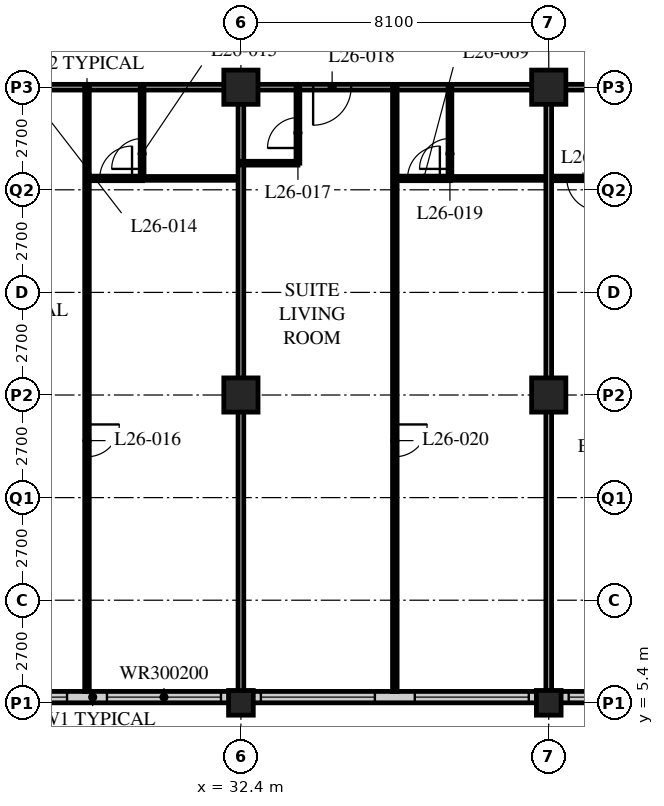
"""IFC4 building model, lengths in metres.
Left out: names, types, materials, properties, quantities, classifications, styles, units other than length and angle.
Written with IfcOpenShell. Run it as: python <this file> out.ifc"""

import sys

from ifc_helpers import new_model, si_unit, direction, frame, frame_2d, origin, origin_2d, place, context, subcontext, project, spatial, rectangle, hollow_rectangle, extrude, element, fill, save


model = new_model("IFC4")
c1 = context("Model", 3, precision=1e-05, world=origin(), true_north=direction((0.0, 1.0)))
c2 = subcontext(c1, "Body", "Model", "MODEL_VIEW")
j1 = project(units=[si_unit("LENGTHUNIT", "METRE"), si_unit("PLANEANGLEUNIT", "RADIAN")], contexts=[c1])
p1 = place(None, origin())
s1 = spatial("IfcSite", under=j1, at=p1, CompositionType="ELEMENT")
p2 = place(p1, origin())
s2 = spatial("IfcBuilding", under=s1, at=p2, CompositionType="ELEMENT")
p3 = place(p2, frame((0.0, 0.0, 106.8)))
s3 = spatial("IfcBuildingStorey", under=s2, at=p3, CompositionType="ELEMENT", Elevation=106.8)
p4 = place(p3, frame((32.4, 5.4, 0.0), z_axis=(0.0, 0.0, 1.0), x_axis=(1.0, 0.0, 0.0)))
e1 = element("IfcColumn", 1, at=p4, inside=s3, PredefinedType="COLUMN", context=c2, shape_type="SweptSolid", body=[
    extrude(hollow_rectangle(XDim=0.65, YDim=0.65, WallThickness=0.055, at=origin_2d()), origin(), (0.0, 0.0, 1.0), 3.4),
])
for number, where, z_axis, x_axis in (
    (2, (32.4, 13.5, 0.0), (0.0, 0.0, 1.0), (1.0, 0.0, 0.0)),
    (3, (32.4, 21.6, 0.0), (0.0, 0.0, 1.0), (1.0, 0.0, 0.0)),
):
    element("IfcColumn", number, at=place(p3, frame(where, z_axis=z_axis, x_axis=x_axis)), inside=s3, PredefinedType="COLUMN", context=c2, shape_type="SweptSolid", body=[
        extrude(hollow_rectangle(XDim=0.9, YDim=0.9, WallThickness=0.09, at=origin_2d()), origin(), (0.0, 0.0, 1.0), 3.4),
    ])
p5 = place(p3, frame((40.5, 5.4, 0.0), z_axis=(0.0, 0.0, 1.0), x_axis=(1.0, 0.0, 0.0)))
e4 = element("IfcColumn", 4, at=p5, inside=s3, PredefinedType="COLUMN", context=c2, shape_type="SweptSolid", body=[
    extrude(hollow_rectangle(XDim=0.65, YDim=0.65, WallThickness=0.055, at=origin_2d()), origin(), (0.0, 0.0, 1.0), 3.4),
])
for number, where, z_axis, x_axis in (
    (5, (40.5, 13.5, 0.0), (0.0, 0.0, 1.0), (1.0, 0.0, 0.0)),
    (6, (40.5, 21.6, 0.0), (0.0, 0.0, 1.0), (1.0, 0.0, 0.0)),
):
    element("IfcColumn", number, at=place(p3, frame(where, z_axis=z_axis, x_axis=x_axis)), inside=s3, PredefinedType="COLUMN", context=c2, shape_type="SweptSolid", body=[
        extrude(hollow_rectangle(XDim=0.9, YDim=0.9, WallThickness=0.09, at=origin_2d()), origin(), (0.0, 0.0, 1.0), 3.4),
    ])
p6 = place(p3, frame((8.4, 5.55, 0.0), z_axis=(0.0, 0.0, 1.0), x_axis=(1.0, 0.0, 0.0)))
e7 = element("IfcWall", 7, at=p6, inside=s3, PredefinedType="SOLIDWALL", context=c2, shape_type="SweptSolid", body=[
    extrude(rectangle(XDim=40.2, YDim=0.3, at=frame_2d((20.1, 0.0))), origin(), (0.0, 0.0, 1.0), 3.19),
])
p7 = place(p6, frame((0.225, 0.0, 0.9)))
e8 = element("IfcOpeningElement", 8, at=p7, cuts=e7, PredefinedType="OPENING", context=c2, shape_type="SweptSolid", body=[
    extrude(rectangle(XDim=3.0, YDim=2.0, at=frame_2d((1.5, 1.0))), frame((0.0, 0.16, 0.0), z_axis=(0.0, -1.0, 0.0), x_axis=(1.0, 0.0, 0.0)), (0.0, 0.0, 1.0), 0.32),
])
p8 = place(p6, frame((4.275, 0.0, 0.9)))
e9 = element("IfcOpeningElement", 9, at=p8, cuts=e7, PredefinedType="OPENING", context=c2, shape_type="SweptSolid", body=[
    extrude(rectangle(XDim=3.0, YDim=2.0, at=frame_2d((1.5, 1.0))), frame((0.0, 0.16, 0.0), z_axis=(0.0, -1.0, 0.0), x_axis=(1.0, 0.0, 0.0)), (0.0, 0.0, 1.0), 0.32),
])
p9 = place(p6, frame((8.325, 0.0, 0.9)))
e10 = element("IfcOpeningElement", 10, at=p9, cuts=e7, PredefinedType="OPENING", context=c2, shape_type="SweptSolid", body=[
    extrude(rectangle(XDim=3.0, YDim=2.0, at=frame_2d((1.5, 1.0))), frame((0.0, 0.16, 0.0), z_axis=(0.0, -1.0, 0.0), x_axis=(1.0, 0.0, 0.0)), (0.0, 0.0, 1.0), 0.32),
])
p10 = place(p6, frame((12.375, 0.0, 0.9)))
e11 = element("IfcOpeningElement", 11, at=p10, cuts=e7, PredefinedType="OPENING", context=c2, shape_type="SweptSolid", body=[
    extrude(rectangle(XDim=3.0, YDim=2.0, at=frame_2d((1.5, 1.0))), frame((0.0, 0.16, 0.0), z_axis=(0.0, -1.0, 0.0), x_axis=(1.0, 0.0, 0.0)), (0.0, 0.0, 1.0), 0.32),
])
p11 = place(p6, frame((16.425, 0.0, 0.9)))
e12 = element("IfcOpeningElement", 12, at=p11, cuts=e7, PredefinedType="OPENING", context=c2, shape_type="SweptSolid", body=[
    extrude(rectangle(XDim=3.0, YDim=2.0, at=frame_2d((1.5, 1.0))), frame((0.0, 0.16, 0.0), z_axis=(0.0, -1.0, 0.0), x_axis=(1.0, 0.0, 0.0)), (0.0, 0.0, 1.0), 0.32),
])
p12 = place(p6, frame((20.475, 0.0, 0.9)))
e13 = element("IfcOpeningElement", 13, at=p12, cuts=e7, PredefinedType="OPENING", context=c2, shape_type="SweptSolid", body=[
    extrude(rectangle(XDim=3.0, YDim=2.0, at=frame_2d((1.5, 1.0))), frame((0.0, 0.16, 0.0), z_axis=(0.0, -1.0, 0.0), x_axis=(1.0, 0.0, 0.0)), (0.0, 0.0, 1.0), 0.32),
])
p13 = place(p6, frame((24.525, 0.0, 0.9)))
e14 = element("IfcOpeningElement", 14, at=p13, cuts=e7, PredefinedType="OPENING", context=c2, shape_type="SweptSolid", body=[
    extrude(rectangle(XDim=3.0, YDim=2.0, at=frame_2d((1.5, 1.0))), frame((0.0, 0.16, 0.0), z_axis=(0.0, -1.0, 0.0), x_axis=(1.0, 0.0, 0.0)), (0.0, 0.0, 1.0), 0.32),
])
p14 = place(p6, frame((28.575, 0.0, 0.9)))
e15 = element("IfcOpeningElement", 15, at=p14, cuts=e7, PredefinedType="OPENING", context=c2, shape_type="SweptSolid", body=[
    extrude(rectangle(XDim=3.0, YDim=2.0, at=frame_2d((1.5, 1.0))), frame((0.0, 0.16, 0.0), z_axis=(0.0, -1.0, 0.0), x_axis=(1.0, 0.0, 0.0)), (0.0, 0.0, 1.0), 0.32),
])
p15 = place(p6, frame((32.625, 0.0, 0.9)))
e16 = element("IfcOpeningElement", 16, at=p15, cuts=e7, PredefinedType="OPENING", context=c2, shape_type="SweptSolid", body=[
    extrude(rectangle(XDim=3.0, YDim=2.0, at=frame_2d((1.5, 1.0))), frame((0.0, 0.16, 0.0), z_axis=(0.0, -1.0, 0.0), x_axis=(1.0, 0.0, 0.0)), (0.0, 0.0, 1.0), 0.32),
])
p16 = place(p6, frame((36.675, 0.0, 0.9)))
e17 = element("IfcOpeningElement", 17, at=p16, cuts=e7, PredefinedType="OPENING", context=c2, shape_type="SweptSolid", body=[
    extrude(rectangle(XDim=3.0, YDim=2.0, at=frame_2d((1.5, 1.0))), frame((0.0, 0.16, 0.0), z_axis=(0.0, -1.0, 0.0), x_axis=(1.0, 0.0, 0.0)), (0.0, 0.0, 1.0), 0.32),
])
p17 = place(p3, frame((12.15, 21.6, 0.0), z_axis=(0.0, 0.0, 1.0), x_axis=(1.0, 0.0, 0.0)))
e18 = element("IfcWall", 18, at=p17, inside=s3, PredefinedType="PARTITIONING", context=c2, shape_type="SweptSolid", body=[
    extrude(rectangle(XDim=32.4, YDim=0.15, at=frame_2d((16.2, 0.0))), origin(), (0.0, 0.0, 1.0), 2.578),
])
p18 = place(p17, frame((5.95, 0.0, 0.0)))
e19 = element("IfcOpeningElement", 19, at=p18, cuts=e18, PredefinedType="OPENING", context=c2, shape_type="SweptSolid", body=[
    extrude(rectangle(XDim=1.0, YDim=2.1, at=frame_2d((0.5, 1.05))), frame((0.0, 0.085, 0.0), z_axis=(0.0, -1.0, 0.0), x_axis=(1.0, 0.0, 0.0)), (0.0, 0.0, 1.0), 0.17),
])
p19 = place(p17, frame((14.05, 0.0, 0.0)))
e20 = element("IfcOpeningElement", 20, at=p19, cuts=e18, PredefinedType="OPENING", context=c2, shape_type="SweptSolid", body=[
    extrude(rectangle(XDim=1.0, YDim=2.1, at=frame_2d((0.5, 1.05))), frame((0.0, 0.085, 0.0), z_axis=(0.0, -1.0, 0.0), x_axis=(1.0, 0.0, 0.0)), (0.0, 0.0, 1.0), 0.17),
])
p20 = place(p17, frame((22.15, 0.0, 0.0)))
e21 = element("IfcOpeningElement", 21, at=p20, cuts=e18, PredefinedType="OPENING", context=c2, shape_type="SweptSolid", body=[
    extrude(rectangle(XDim=1.0, YDim=2.1, at=frame_2d((0.5, 1.05))), frame((0.0, 0.085, 0.0), z_axis=(0.0, -1.0, 0.0), x_axis=(1.0, 0.0, 0.0)), (0.0, 0.0, 1.0), 0.17),
])
p21 = place(p17, frame((1.525, 0.0, 0.0)))
e22 = element("IfcOpeningElement", 22, at=p21, cuts=e18, PredefinedType="OPENING", context=c2, shape_type="SweptSolid", body=[
    extrude(rectangle(XDim=1.0, YDim=2.1, at=frame_2d((0.5, 1.05))), frame((0.0, 0.085, 0.0), z_axis=(0.0, -1.0, 0.0), x_axis=(1.0, 0.0, 0.0)), (0.0, 0.0, 1.0), 0.17),
])
p22 = place(p17, frame((29.875, 0.0, 0.0)))
e23 = element("IfcOpeningElement", 23, at=p22, cuts=e18, PredefinedType="OPENING", context=c2, shape_type="SweptSolid", body=[
    extrude(rectangle(XDim=1.0, YDim=2.1, at=frame_2d((0.5, 1.05))), frame((0.0, 0.085, 0.0), z_axis=(0.0, -1.0, 0.0), x_axis=(1.0, 0.0, 0.0)), (0.0, 0.0, 1.0), 0.17),
])
p23 = place(p3, frame((29.8, 19.2, 0.0), z_axis=(0.0, 0.0, 1.0), x_axis=(1.0, 0.0, 0.0)))
e24 = element("IfcWall", 24, at=p23, inside=s3, PredefinedType="PARTITIONING", context=c2, shape_type="SweptSolid", body=[
    extrude(rectangle(XDim=2.6, YDim=0.1, at=frame_2d((1.3, 0.0))), origin(), (0.0, 0.0, 1.0), 3.19),
])
p24 = place(p3, frame((29.8, 21.6, 0.0), z_axis=(0.0, 0.0, 1.0), x_axis=(0.0, -1.0, 0.0)))
e25 = element("IfcWall", 25, at=p24, inside=s3, PredefinedType="PARTITIONING", context=c2, shape_type="SweptSolid", body=[
    extrude(rectangle(XDim=2.4, YDim=0.1, at=frame_2d((1.2, 0.0))), origin(), (0.0, 0.0, 1.0), 3.19),
])
p25 = place(p24, frame((1.35, 0.0, 0.0)))
e26 = element("IfcOpeningElement", 26, at=p25, cuts=e25, PredefinedType="OPENING", context=c2, shape_type="SweptSolid", body=[
    extrude(rectangle(XDim=0.8, YDim=2.1, at=frame_2d((0.4, 1.05))), frame((0.0, 0.06, 0.0), z_axis=(0.0, -1.0, 0.0), x_axis=(1.0, 0.0, 0.0)), (0.0, 0.0, 1.0), 0.12),
])
p26 = place(p3, frame((28.35, 21.6, 0.0), z_axis=(0.0, 0.0, 1.0), x_axis=(0.0, -1.0, 0.0)))
e27 = element("IfcWall", 27, at=p26, inside=s3, PredefinedType="PARTITIONING", context=c2, shape_type="SweptSolid", body=[
    extrude(rectangle(XDim=15.9, YDim=0.12, at=frame_2d((7.95, 0.0))), origin(), (0.0, 0.0, 1.0), 3.19),
])
p27 = place(p26, frame((8.875, 0.0, 0.0)))
e28 = element("IfcOpeningElement", 28, at=p27, cuts=e27, PredefinedType="OPENING", context=c2, shape_type="SweptSolid", body=[
    extrude(rectangle(XDim=0.85, YDim=2.1, at=frame_2d((0.425, 1.05))), frame((0.0, 0.07, 0.0), z_axis=(0.0, -1.0, 0.0), x_axis=(1.0, 0.0, 0.0)), (0.0, 0.0, 1.0), 0.14),
])
p28 = place(p3, frame((32.4, 21.6, 0.0), z_axis=(0.0, 0.0, 1.0), x_axis=(0.0, -1.0, 0.0)))
e29 = element("IfcWall", 29, at=p28, inside=s3, PredefinedType="PARTITIONING", context=c2, shape_type="SweptSolid", body=[
    extrude(rectangle(XDim=15.9, YDim=0.15, at=frame_2d((7.95, 0.0))), origin(), (0.0, 0.0, 1.0), 2.578),
])
p29 = place(p3, frame((32.4, 19.6, 0.0), z_axis=(0.0, 0.0, 1.0), x_axis=(1.0, 0.0, 0.0)))
e30 = element("IfcWall", 30, at=p29, inside=s3, PredefinedType="PARTITIONING", context=c2, shape_type="SweptSolid", body=[
    extrude(rectangle(XDim=1.5, YDim=0.1, at=frame_2d((0.75, 0.0))), origin(), (0.0, 0.0, 1.0), 3.19),
])
p30 = place(p3, frame((33.9, 21.6, 0.0), z_axis=(0.0, 0.0, 1.0), x_axis=(0.0, -1.0, 0.0)))
e31 = element("IfcWall", 31, at=p30, inside=s3, PredefinedType="PARTITIONING", context=c2, shape_type="SweptSolid", body=[
    extrude(rectangle(XDim=2.0, YDim=0.1, at=frame_2d((1.0, 0.0))), origin(), (0.0, 0.0, 1.0), 3.19),
])
p31 = place(p30, frame((0.8, 0.0, 0.0)))
e32 = element("IfcOpeningElement", 32, at=p31, cuts=e31, PredefinedType="OPENING", context=c2, shape_type="SweptSolid", body=[
    extrude(rectangle(XDim=0.8, YDim=2.1, at=frame_2d((0.4, 1.05))), frame((0.0, 0.06, 0.0), z_axis=(0.0, -1.0, 0.0), x_axis=(1.0, 0.0, 0.0)), (0.0, 0.0, 1.0), 0.12),
])
p32 = place(p3, frame((37.9, 19.2, 0.0), z_axis=(0.0, 0.0, 1.0), x_axis=(1.0, 0.0, 0.0)))
e33 = element("IfcWall", 33, at=p32, inside=s3, PredefinedType="PARTITIONING", context=c2, shape_type="SweptSolid", body=[
    extrude(rectangle(XDim=2.6, YDim=0.1, at=frame_2d((1.3, 0.0))), origin(), (0.0, 0.0, 1.0), 3.19),
])
p33 = place(p3, frame((37.9, 21.6, 0.0), z_axis=(0.0, 0.0, 1.0), x_axis=(0.0, -1.0, 0.0)))
e34 = element("IfcWall", 34, at=p33, inside=s3, PredefinedType="PARTITIONING", context=c2, shape_type="SweptSolid", body=[
    extrude(rectangle(XDim=2.4, YDim=0.1, at=frame_2d((1.2, 0.0))), origin(), (0.0, 0.0, 1.0), 3.19),
])
p34 = place(p33, frame((1.35, 0.0, 0.0)))
e35 = element("IfcOpeningElement", 35, at=p34, cuts=e34, PredefinedType="OPENING", context=c2, shape_type="SweptSolid", body=[
    extrude(rectangle(XDim=0.8, YDim=2.1, at=frame_2d((0.4, 1.05))), frame((0.0, 0.06, 0.0), z_axis=(0.0, -1.0, 0.0), x_axis=(1.0, 0.0, 0.0)), (0.0, 0.0, 1.0), 0.12),
])
p35 = place(p3, frame((36.45, 21.6, 0.0), z_axis=(0.0, 0.0, 1.0), x_axis=(0.0, -1.0, 0.0)))
e36 = element("IfcWall", 36, at=p35, inside=s3, PredefinedType="PARTITIONING", context=c2, shape_type="SweptSolid", body=[
    extrude(rectangle(XDim=15.9, YDim=0.12, at=frame_2d((7.95, 0.0))), origin(), (0.0, 0.0, 1.0), 3.19),
])
p36 = place(p35, frame((8.875, 0.0, 0.0)))
e37 = element("IfcOpeningElement", 37, at=p36, cuts=e36, PredefinedType="OPENING", context=c2, shape_type="SweptSolid", body=[
    extrude(rectangle(XDim=0.85, YDim=2.1, at=frame_2d((0.425, 1.05))), frame((0.0, 0.07, 0.0), z_axis=(0.0, -1.0, 0.0), x_axis=(1.0, 0.0, 0.0)), (0.0, 0.0, 1.0), 0.14),
])
p37 = place(p3, frame((40.5, 19.2, 0.0), z_axis=(0.0, 0.0, 1.0), x_axis=(1.0, 0.0, 0.0)))
e38 = element("IfcWall", 38, at=p37, inside=s3, PredefinedType="PARTITIONING", context=c2, shape_type="SweptSolid", body=[
    extrude(rectangle(XDim=8.05, YDim=0.12, at=frame_2d((4.025, 0.0))), origin(), (0.0, 0.0, 1.0), 3.19),
])
p38 = place(p37, frame((0.475, 0.0, 0.0)))
e39 = element("IfcOpeningElement", 39, at=p38, cuts=e38, PredefinedType="OPENING", context=c2, shape_type="SweptSolid", body=[
    extrude(rectangle(XDim=0.85, YDim=2.1, at=frame_2d((0.425, 1.05))), frame((0.0, 0.07, 0.0), z_axis=(0.0, -1.0, 0.0), x_axis=(1.0, 0.0, 0.0)), (0.0, 0.0, 1.0), 0.14),
])
p39 = place(p37, frame((4.325, 0.0, 0.0)))
e40 = element("IfcOpeningElement", 40, at=p39, cuts=e38, PredefinedType="OPENING", context=c2, shape_type="SweptSolid", body=[
    extrude(rectangle(XDim=0.85, YDim=2.1, at=frame_2d((0.425, 1.05))), frame((0.0, 0.07, 0.0), z_axis=(0.0, -1.0, 0.0), x_axis=(1.0, 0.0, 0.0)), (0.0, 0.0, 1.0), 0.14),
])
p40 = place(p3, frame((40.5, 21.6, 0.0), z_axis=(0.0, 0.0, 1.0), x_axis=(0.0, -1.0, 0.0)))
e41 = element("IfcWall", 41, at=p40, inside=s3, PredefinedType="PARTITIONING", context=c2, shape_type="SweptSolid", body=[
    extrude(rectangle(XDim=15.9, YDim=0.15, at=frame_2d((7.95, 0.0))), origin(), (0.0, 0.0, 1.0), 2.578),
])
p41 = place(p3, frame((29.81, 19.2, 0.0), z_axis=(0.0, 0.0, 1.0), x_axis=(-1.0, 0.0, 0.0)))
e42 = element("IfcWall", 42, at=p41, inside=s3, PredefinedType="PARTITIONING", context=c2, shape_type="SweptSolid", body=[
    extrude(rectangle(XDim=1.46, YDim=0.12, at=frame_2d((0.73, 0.0))), origin(), (0.0, 0.0, 1.0), 3.19),
])
p42 = place(p41, frame((0.275, 0.0, 0.0)))
e43 = element("IfcOpeningElement", 43, at=p42, cuts=e42, PredefinedType="OPENING", context=c2, shape_type="SweptSolid", body=[
    extrude(rectangle(XDim=0.85, YDim=2.1, at=frame_2d((0.425, 1.05))), frame((0.0, 0.07, 0.0), z_axis=(0.0, -1.0, 0.0), x_axis=(1.0, 0.0, 0.0)), (0.0, 0.0, 1.0), 0.14),
])
p43 = place(p3, frame((37.91, 19.2, 0.0), z_axis=(0.0, 0.0, 1.0), x_axis=(-1.0, 0.0, 0.0)))
e44 = element("IfcWall", 44, at=p43, inside=s3, PredefinedType="PARTITIONING", context=c2, shape_type="SweptSolid", body=[
    extrude(rectangle(XDim=1.46, YDim=0.12, at=frame_2d((0.73, 0.0))), origin(), (0.0, 0.0, 1.0), 3.19),
])
p44 = place(p43, frame((0.275, 0.0, 0.0)))
e45 = element("IfcOpeningElement", 45, at=p44, cuts=e44, PredefinedType="OPENING", context=c2, shape_type="SweptSolid", body=[
    extrude(rectangle(XDim=0.85, YDim=2.1, at=frame_2d((0.425, 1.05))), frame((0.0, 0.07, 0.0), z_axis=(0.0, -1.0, 0.0), x_axis=(1.0, 0.0, 0.0)), (0.0, 0.0, 1.0), 0.14),
])
p45 = place(p11, origin())
e46 = element("IfcWindow", 46, at=p45, inside=s3, PartitioningType="SINGLE_PANEL", PredefinedType="WINDOW", context=c2, shape_type="SweptSolid", body=[
    extrude(rectangle(XDim=3.0, YDim=2.0, at=frame_2d((1.5, 1.0))), frame((0.0, 0.03, 0.0), z_axis=(0.0, -1.0, 0.0), x_axis=(1.0, 0.0, 0.0)), (0.0, 0.0, 1.0), 0.06),
])
fill(e12, e46)
p46 = place(p12, origin())
e47 = element("IfcWindow", 47, at=p46, inside=s3, PartitioningType="SINGLE_PANEL", PredefinedType="WINDOW", context=c2, shape_type="SweptSolid", body=[
    extrude(rectangle(XDim=3.0, YDim=2.0, at=frame_2d((1.5, 1.0))), frame((0.0, 0.03, 0.0), z_axis=(0.0, -1.0, 0.0), x_axis=(1.0, 0.0, 0.0)), (0.0, 0.0, 1.0), 0.06),
])
fill(e13, e47)
p47 = place(p13, origin())
e48 = element("IfcWindow", 48, at=p47, inside=s3, PartitioningType="SINGLE_PANEL", PredefinedType="WINDOW", context=c2, shape_type="SweptSolid", body=[
    extrude(rectangle(XDim=3.0, YDim=2.0, at=frame_2d((1.5, 1.0))), frame((0.0, 0.03, 0.0), z_axis=(0.0, -1.0, 0.0), x_axis=(1.0, 0.0, 0.0)), (0.0, 0.0, 1.0), 0.06),
])
fill(e14, e48)
p48 = place(p14, origin())
e49 = element("IfcWindow", 49, at=p48, inside=s3, PartitioningType="SINGLE_PANEL", PredefinedType="WINDOW", context=c2, shape_type="SweptSolid", body=[
    extrude(rectangle(XDim=3.0, YDim=2.0, at=frame_2d((1.5, 1.0))), frame((0.0, 0.03, 0.0), z_axis=(0.0, -1.0, 0.0), x_axis=(1.0, 0.0, 0.0)), (0.0, 0.0, 1.0), 0.06),
])
fill(e15, e49)
p49 = place(p15, origin())
e50 = element("IfcWindow", 50, at=p49, inside=s3, PartitioningType="SINGLE_PANEL", PredefinedType="WINDOW", context=c2, shape_type="SweptSolid", body=[
    extrude(rectangle(XDim=3.0, YDim=2.0, at=frame_2d((1.5, 1.0))), frame((0.0, 0.03, 0.0), z_axis=(0.0, -1.0, 0.0), x_axis=(1.0, 0.0, 0.0)), (0.0, 0.0, 1.0), 0.06),
])
fill(e16, e50)
p50 = place(p25, origin())
e51 = element("IfcDoor", 51, at=p50, inside=s3, OperationType="SINGLE_SWING_LEFT", PredefinedType="DOOR", context=c2, shape_type="SweptSolid", body=[
    extrude(rectangle(XDim=0.8, YDim=2.1, at=frame_2d((0.4, 1.05))), frame((0.0, 0.025, 0.0), z_axis=(0.0, -1.0, 0.0), x_axis=(1.0, 0.0, 0.0)), (0.0, 0.0, 1.0), 0.05),
])
fill(e26, e51)
p51 = place(p27, origin())
e52 = element("IfcDoor", 52, at=p51, inside=s3, OperationType="SINGLE_SWING_LEFT", PredefinedType="DOOR", context=c2, shape_type="SweptSolid", body=[
    extrude(rectangle(XDim=0.85, YDim=2.1, at=frame_2d((0.425, 1.05))), frame((0.0, 0.025, 0.0), z_axis=(0.0, -1.0, 0.0), x_axis=(1.0, 0.0, 0.0)), (0.0, 0.0, 1.0), 0.05),
])
fill(e28, e52)
p52 = place(p31, origin())
e53 = element("IfcDoor", 53, at=p52, inside=s3, OperationType="SINGLE_SWING_LEFT", PredefinedType="DOOR", context=c2, shape_type="SweptSolid", body=[
    extrude(rectangle(XDim=0.8, YDim=2.1, at=frame_2d((0.4, 1.05))), frame((0.0, 0.025, 0.0), z_axis=(0.0, -1.0, 0.0), x_axis=(1.0, 0.0, 0.0)), (0.0, 0.0, 1.0), 0.05),
])
fill(e32, e53)
p53 = place(p20, origin())
e54 = element("IfcDoor", 54, at=p53, inside=s3, OperationType="SINGLE_SWING_RIGHT", PredefinedType="DOOR", context=c2, shape_type="SweptSolid", body=[
    extrude(rectangle(XDim=1.0, YDim=2.1, at=frame_2d((0.5, 1.05))), frame((0.0, 0.025, 0.0), z_axis=(0.0, -1.0, 0.0), x_axis=(1.0, 0.0, 0.0)), (0.0, 0.0, 1.0), 0.05),
])
fill(e21, e54)
p54 = place(p34, origin())
e55 = element("IfcDoor", 55, at=p54, inside=s3, OperationType="SINGLE_SWING_LEFT", PredefinedType="DOOR", context=c2, shape_type="SweptSolid", body=[
    extrude(rectangle(XDim=0.8, YDim=2.1, at=frame_2d((0.4, 1.05))), frame((0.0, 0.025, 0.0), z_axis=(0.0, -1.0, 0.0), x_axis=(1.0, 0.0, 0.0)), (0.0, 0.0, 1.0), 0.05),
])
fill(e35, e55)
p55 = place(p36, origin())
e56 = element("IfcDoor", 56, at=p55, inside=s3, OperationType="SINGLE_SWING_LEFT", PredefinedType="DOOR", context=c2, shape_type="SweptSolid", body=[
    extrude(rectangle(XDim=0.85, YDim=2.1, at=frame_2d((0.425, 1.05))), frame((0.0, 0.025, 0.0), z_axis=(0.0, -1.0, 0.0), x_axis=(1.0, 0.0, 0.0)), (0.0, 0.0, 1.0), 0.05),
])
fill(e37, e56)
p56 = place(p38, origin())
e57 = element("IfcDoor", 57, at=p56, inside=s3, OperationType="SINGLE_SWING_LEFT", PredefinedType="DOOR", context=c2, shape_type="SweptSolid", body=[
    extrude(rectangle(XDim=0.85, YDim=2.1, at=frame_2d((0.425, 1.05))), frame((0.0, 0.025, 0.0), z_axis=(0.0, -1.0, 0.0), x_axis=(1.0, 0.0, 0.0)), (0.0, 0.0, 1.0), 0.05),
])
fill(e39, e57)
p57 = place(p42, origin())
e58 = element("IfcDoor", 58, at=p57, inside=s3, OperationType="SINGLE_SWING_RIGHT", PredefinedType="DOOR", context=c2, shape_type="SweptSolid", body=[
    extrude(rectangle(XDim=0.85, YDim=2.1, at=frame_2d((0.425, 1.05))), frame((0.0, 0.025, 0.0), z_axis=(0.0, -1.0, 0.0), x_axis=(1.0, 0.0, 0.0)), (0.0, 0.0, 1.0), 0.05),
])
fill(e43, e58)
p58 = place(p44, origin())
e59 = element("IfcDoor", 59, at=p58, inside=s3, OperationType="SINGLE_SWING_RIGHT", PredefinedType="DOOR", context=c2, shape_type="SweptSolid", body=[
    extrude(rectangle(XDim=0.85, YDim=2.1, at=frame_2d((0.425, 1.05))), frame((0.0, 0.025, 0.0), z_axis=(0.0, -1.0, 0.0), x_axis=(1.0, 0.0, 0.0)), (0.0, 0.0, 1.0), 0.05),
])
fill(e45, e59)
save(model, sys.argv[1])
